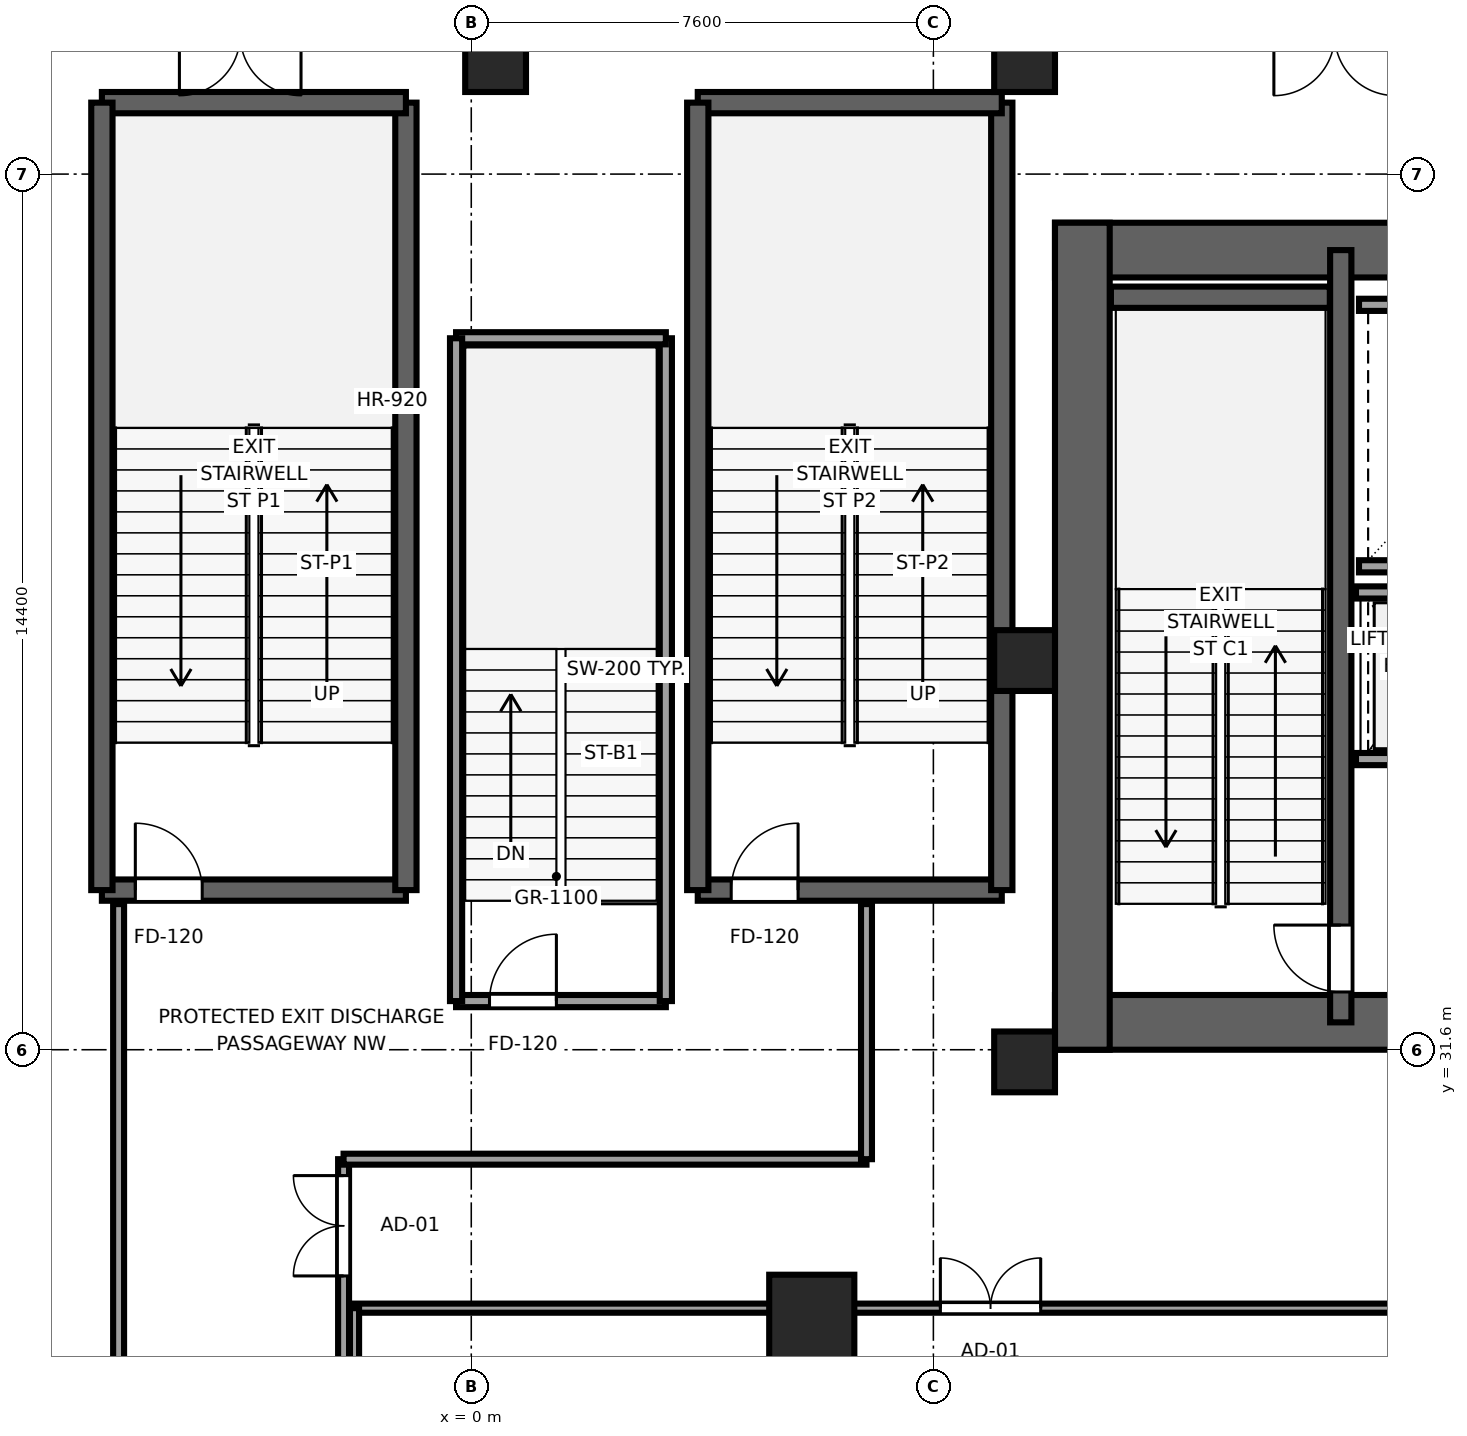
"""IFC4 building model, lengths in metres.
Left out: names, types, materials, properties, quantities, classifications, styles, units other than length and angle.
Written with IfcOpenShell. Run it as: python <this file> out.ifc"""

import sys

from ifc_helpers import new_model, si_unit, direction, frame, frame_2d, origin, origin_2d, place, context, subcontext, project, spatial, rectangle, extrude, source, transform, mapped, element, fill, save


model = new_model("IFC4")
c1 = context("Model", 3, precision=1e-05, world=origin(), true_north=direction((0.0, 1.0)))
c2 = subcontext(c1, "Body", "Model", "MODEL_VIEW")
j1 = project(units=[si_unit("LENGTHUNIT", "METRE"), si_unit("PLANEANGLEUNIT", "RADIAN")], contexts=[c1])
p1 = place(None, origin())
s1 = spatial("IfcSite", under=j1, at=p1, CompositionType="ELEMENT")
p2 = place(p1, origin())
s2 = spatial("IfcBuilding", under=s1, at=p2, CompositionType="ELEMENT")
p3 = place(p2, origin())
s3 = spatial("IfcBuildingStorey", under=s2, at=p3, CompositionType="ELEMENT", Elevation=0.0)
p4 = place(p3, frame((9.6, 32.05, 0.0), z_axis=(0.0, 0.0, 1.0), x_axis=(1.0, 0.0, 0.0)))
e1 = element("IfcWall", 1, at=p4, inside=s3, PredefinedType="SHEAR", context=c2, shape_type="SweptSolid", body=[
    extrude(rectangle(XDim=26.8, YDim=0.9, at=frame_2d((13.4, 0.0))), origin(), (0.0, 0.0, 1.0), 6.0),
])
p5 = place(p4, frame((7.85, 0.0, 0.0), z_axis=(0.0, 0.0, 1.0), x_axis=(-1.0, 0.0, 0.0)))
e2 = element("IfcOpeningElement", 2, at=p5, cuts=e1, PredefinedType="OPENING", context=c2, shape_type="SweptSolid", body=[
    extrude(rectangle(XDim=1.5, YDim=2.04, at=frame_2d((0.75, 1.02))), frame((0.0, 0.46, 0.0), z_axis=(0.0, -1.0, 0.0), x_axis=(1.0, 0.0, 0.0)), (0.0, 0.0, 1.0), 0.92),
])
p6 = place(p4, frame((14.15, 0.0, 0.0), z_axis=(0.0, 0.0, 1.0), x_axis=(-1.0, 0.0, 0.0)))
e3 = element("IfcOpeningElement", 3, at=p6, cuts=e1, PredefinedType="OPENING", context=c2, shape_type="SweptSolid", body=[
    extrude(rectangle(XDim=1.5, YDim=2.04, at=frame_2d((0.75, 1.02))), frame((0.0, 0.46, 0.0), z_axis=(0.0, -1.0, 0.0), x_axis=(1.0, 0.0, 0.0)), (0.0, 0.0, 1.0), 0.92),
])
p7 = place(p4, frame((20.45, 0.0, 0.0), z_axis=(0.0, 0.0, 1.0), x_axis=(-1.0, 0.0, 0.0)))
e4 = element("IfcOpeningElement", 4, at=p7, cuts=e1, PredefinedType="OPENING", context=c2, shape_type="SweptSolid", body=[
    extrude(rectangle(XDim=1.5, YDim=2.04, at=frame_2d((0.75, 1.02))), frame((0.0, 0.46, 0.0), z_axis=(0.0, -1.0, 0.0), x_axis=(1.0, 0.0, 0.0)), (0.0, 0.0, 1.0), 0.92),
])
p8 = place(p3, frame((9.6, 44.75, 0.0), z_axis=(0.0, 0.0, 1.0), x_axis=(1.0, 0.0, 0.0)))
e5 = element("IfcWall", 5, at=p8, inside=s3, PredefinedType="SHEAR", context=c2, shape_type="SweptSolid", body=[
    extrude(rectangle(XDim=26.8, YDim=0.9, at=frame_2d((13.4, 0.0))), origin(), (0.0, 0.0, 1.0), 6.0),
])
p9 = place(p3, frame((10.05, 31.6, 0.0), z_axis=(0.0, 0.0, 1.0), x_axis=(0.0, 1.0, 0.0)))
e6 = element("IfcWall", 6, at=p9, inside=s3, PredefinedType="SHEAR", context=c2, shape_type="SweptSolid", body=[
    extrude(rectangle(XDim=13.6, YDim=0.9, at=frame_2d((6.8, 0.0))), origin(), (0.0, 0.0, 1.0), 6.0),
])
p10 = place(p3, frame((14.3, 32.05, 0.0), z_axis=(0.0, 0.0, 1.0), x_axis=(0.0, 1.0, 0.0)))
e7 = element("IfcWall", 7, at=p10, inside=s3, PredefinedType="SHEAR", context=c2, shape_type="SweptSolid", body=[
    extrude(rectangle(XDim=12.7, YDim=0.35, at=frame_2d((6.35, 0.0))), origin(), (0.0, 0.0, 1.0), 6.0),
])
p11 = place(p10, frame((1.6, 0.0, 0.0), z_axis=(0.0, 0.0, 1.0), x_axis=(-1.0, 0.0, 0.0)))
e8 = element("IfcOpeningElement", 8, at=p11, cuts=e7, PredefinedType="OPENING", context=c2, shape_type="SweptSolid", body=[
    extrude(rectangle(XDim=1.1, YDim=2.12, at=frame_2d((0.55, 1.06))), frame((0.0, 0.185, 0.0), z_axis=(0.0, -1.0, 0.0), x_axis=(1.0, 0.0, 0.0)), (0.0, 0.0, 1.0), 0.37),
])
p12 = place(p3, frame((10.52, 43.975, 0.0), z_axis=(0.0, 0.0, 1.0), x_axis=(1.0, 0.0, 0.0)))
e9 = element("IfcWall", 9, at=p12, inside=s3, PredefinedType="SHEAR", context=c2, shape_type="SweptSolid", body=[
    extrude(rectangle(XDim=3.6, YDim=0.35, at=frame_2d((1.8, 0.0))), origin(), (0.0, 0.0, 1.0), 6.0),
])
p13 = place(p3, frame((-6.075, 34.225, 0.0), z_axis=(0.0, 0.0, 1.0), x_axis=(1.0, 0.0, 0.0)))
e10 = element("IfcWall", 10, at=p13, inside=s3, PredefinedType="SHEAR", context=c2, shape_type="SweptSolid", body=[
    extrude(rectangle(XDim=5.0, YDim=0.35, at=frame_2d((2.5, 0.0))), origin(), (0.0, 0.0, 1.0), 6.0),
])
p14 = place(p13, frame((1.65, 0.0, 0.0), z_axis=(0.0, 0.0, 1.0), x_axis=(-1.0, 0.0, 0.0)))
e11 = element("IfcOpeningElement", 11, at=p14, cuts=e10, PredefinedType="OPENING", context=c2, shape_type="SweptSolid", body=[
    extrude(rectangle(XDim=1.1, YDim=2.12, at=frame_2d((0.55, 1.06))), frame((0.0, 0.185, 0.0), z_axis=(0.0, -1.0, 0.0), x_axis=(1.0, 0.0, 0.0)), (0.0, 0.0, 1.0), 0.37),
])
p15 = place(p3, frame((-1.075, 34.225, 0.0), z_axis=(0.0, 0.0, 1.0), x_axis=(0.0, 1.0, 0.0)))
e12 = element("IfcWall", 12, at=p15, inside=s3, PredefinedType="SHEAR", context=c2, shape_type="SweptSolid", body=[
    extrude(rectangle(XDim=12.95, YDim=0.35, at=frame_2d((6.475, 0.0))), origin(), (0.0, 0.0, 1.0), 6.0),
])
p16 = place(p3, frame((-1.075, 47.175, 0.0), z_axis=(0.0, 0.0, 1.0), x_axis=(-1.0, 0.0, 0.0)))
e13 = element("IfcWall", 13, at=p16, inside=s3, PredefinedType="SHEAR", context=c2, shape_type="SweptSolid", body=[
    extrude(rectangle(XDim=5.0, YDim=0.35, at=frame_2d((2.5, 0.0))), origin(), (0.0, 0.0, 1.0), 6.0),
])
p17 = place(p3, frame((-6.075, 47.175, 0.0), z_axis=(0.0, 0.0, 1.0), x_axis=(0.0, -1.0, 0.0)))
e14 = element("IfcWall", 14, at=p17, inside=s3, PredefinedType="SHEAR", context=c2, shape_type="SweptSolid", body=[
    extrude(rectangle(XDim=12.95, YDim=0.35, at=frame_2d((6.475, 0.0))), origin(), (0.0, 0.0, 1.0), 6.0),
])
p18 = place(p3, frame((3.725, 34.225, 0.0), z_axis=(0.0, 0.0, 1.0), x_axis=(1.0, 0.0, 0.0)))
e15 = element("IfcWall", 15, at=p18, inside=s3, PredefinedType="SHEAR", context=c2, shape_type="SweptSolid", body=[
    extrude(rectangle(XDim=5.0, YDim=0.35, at=frame_2d((2.5, 0.0))), origin(), (0.0, 0.0, 1.0), 6.0),
])
p19 = place(p18, frame((1.65, 0.0, 0.0), z_axis=(0.0, 0.0, 1.0), x_axis=(-1.0, 0.0, 0.0)))
e16 = element("IfcOpeningElement", 16, at=p19, cuts=e15, PredefinedType="OPENING", context=c2, shape_type="SweptSolid", body=[
    extrude(rectangle(XDim=1.1, YDim=2.12, at=frame_2d((0.55, 1.06))), frame((0.0, 0.185, 0.0), z_axis=(0.0, -1.0, 0.0), x_axis=(1.0, 0.0, 0.0)), (0.0, 0.0, 1.0), 0.37),
])
p20 = place(p3, frame((8.725, 34.225, 0.0), z_axis=(0.0, 0.0, 1.0), x_axis=(0.0, 1.0, 0.0)))
e17 = element("IfcWall", 17, at=p20, inside=s3, PredefinedType="SHEAR", context=c2, shape_type="SweptSolid", body=[
    extrude(rectangle(XDim=12.95, YDim=0.35, at=frame_2d((6.475, 0.0))), origin(), (0.0, 0.0, 1.0), 6.0),
])
p21 = place(p3, frame((8.725, 47.175, 0.0), z_axis=(0.0, 0.0, 1.0), x_axis=(-1.0, 0.0, 0.0)))
e18 = element("IfcWall", 18, at=p21, inside=s3, PredefinedType="SHEAR", context=c2, shape_type="SweptSolid", body=[
    extrude(rectangle(XDim=5.0, YDim=0.35, at=frame_2d((2.5, 0.0))), origin(), (0.0, 0.0, 1.0), 6.0),
])
p22 = place(p3, frame((3.725, 47.175, 0.0), z_axis=(0.0, 0.0, 1.0), x_axis=(0.0, -1.0, 0.0)))
e19 = element("IfcWall", 19, at=p22, inside=s3, PredefinedType="SHEAR", context=c2, shape_type="SweptSolid", body=[
    extrude(rectangle(XDim=12.95, YDim=0.35, at=frame_2d((6.475, 0.0))), origin(), (0.0, 0.0, 1.0), 6.0),
])
m1 = source(origin(), c2, "Body", "SweptSolid", [
    extrude(rectangle(XDim=1.0, YDim=1.0, at=origin_2d()), origin(), (0.0, 0.0, 1.0), 6.0),
])
for number, where, z_axis, x_axis in (
    (20, (0.4, 47.85, 0.0), (0.0, 0.0, 1.0), (1.0, 0.0, 0.0)),
    (21, (9.1, 47.85, 0.0), (0.0, 0.0, 1.0), (1.0, 0.0, 0.0)),
    (22, (9.1, 38.0, 0.0), (0.0, 0.0, 1.0), (1.0, 0.0, 0.0)),
    (23, (9.1, 31.4, 0.0), (0.0, 0.0, 1.0), (1.0, 0.0, 0.0)),
):
    element("IfcColumn", number, at=place(p3, frame(where, z_axis=z_axis, x_axis=x_axis)), inside=s3, PredefinedType="COLUMN", context=c2, shape_type="MappedRepresentation", body=[
        mapped(m1, transform((0.0, 0.0, 0.0), x_axis=(1.0, 0.0, 0.0), y_axis=(0.0, 1.0, 0.0), z_axis=(0.0, 0.0, 1.0), scale=1.0)),
    ])
m2 = source(origin(), c2, "Body", "SweptSolid", [
    extrude(rectangle(XDim=1.4, YDim=1.4, at=origin_2d()), origin(), (0.0, 0.0, 1.0), 6.0),
])
p23 = place(p3, frame((5.6, 27.2, 0.0), z_axis=(0.0, 0.0, 1.0), x_axis=(1.0, 0.0, 0.0)))
e24 = element("IfcColumn", 24, at=p23, inside=s3, PredefinedType="COLUMN", context=c2, shape_type="MappedRepresentation", body=[
    mapped(m2, transform((0.0, 0.0, 0.0), x_axis=(1.0, 0.0, 0.0), y_axis=(0.0, 1.0, 0.0), z_axis=(0.0, 0.0, 1.0), scale=1.0)),
])
p24 = place(p3, frame((-0.25, 32.4, 0.0), z_axis=(0.0, 0.0, 1.0), x_axis=(1.0, 0.0, 0.0)))
e25 = element("IfcWall", 25, at=p24, inside=s3, PredefinedType="SOLIDWALL", context=c2, shape_type="SweptSolid", body=[
    extrude(rectangle(XDim=3.45, YDim=0.2, at=frame_2d((1.725, 0.0))), origin(), (0.0, 0.0, 1.0), 5.74),
])
p25 = place(p24, frame((1.65, 0.0, 0.0), z_axis=(0.0, 0.0, 1.0), x_axis=(-1.0, 0.0, 0.0)))
e26 = element("IfcOpeningElement", 26, at=p25, cuts=e25, PredefinedType="OPENING", context=c2, shape_type="SweptSolid", body=[
    extrude(rectangle(XDim=1.1, YDim=2.12, at=frame_2d((0.55, 1.06))), frame((0.0, 0.11, 0.0), z_axis=(0.0, -1.0, 0.0), x_axis=(1.0, 0.0, 0.0)), (0.0, 0.0, 1.0), 0.22),
])
p26 = place(p3, frame((3.2, 32.4, 0.0), z_axis=(0.0, 0.0, 1.0), x_axis=(0.0, 1.0, 0.0)))
e27 = element("IfcWall", 27, at=p26, inside=s3, PredefinedType="SOLIDWALL", context=c2, shape_type="SweptSolid", body=[
    extrude(rectangle(XDim=10.9, YDim=0.2, at=frame_2d((5.45, 0.0))), origin(), (0.0, 0.0, 1.0), 5.74),
])
p27 = place(p3, frame((3.2, 43.3, 0.0), z_axis=(0.0, 0.0, 1.0), x_axis=(-1.0, 0.0, 0.0)))
e28 = element("IfcWall", 28, at=p27, inside=s3, PredefinedType="SOLIDWALL", context=c2, shape_type="SweptSolid", body=[
    extrude(rectangle(XDim=3.45, YDim=0.2, at=frame_2d((1.725, 0.0))), origin(), (0.0, 0.0, 1.0), 5.74),
])
p28 = place(p3, frame((-0.25, 43.3, 0.0), z_axis=(0.0, 0.0, 1.0), x_axis=(0.0, -1.0, 0.0)))
e29 = element("IfcWall", 29, at=p28, inside=s3, PredefinedType="SOLIDWALL", context=c2, shape_type="SweptSolid", body=[
    extrude(rectangle(XDim=10.9, YDim=0.2, at=frame_2d((5.45, 0.0))), origin(), (0.0, 0.0, 1.0), 5.74),
])
for number, where, z_axis, x_axis in (
    (30, (14.6, 39.55, 0.0), (0.0, 0.0, 1.0), (1.0, 0.0, 0.0)),
    (31, (14.6, 43.85, 0.0), (0.0, 0.0, 1.0), (1.0, 0.0, 0.0)),
):
    element("IfcWall", number, at=place(p3, frame(where, z_axis=z_axis, x_axis=x_axis)), inside=s3, PredefinedType="SOLIDWALL", context=c2, shape_type="SweptSolid", body=[
        extrude(rectangle(XDim=4.1, YDim=0.2, at=frame_2d((2.05, 0.0))), origin(), (0.0, 0.0, 1.0), 5.74),
    ])
p29 = place(p3, frame((14.55, 36.38, 0.0), z_axis=(0.0, 0.0, 1.0), x_axis=(1.0, 0.0, 0.0)))
e32 = element("IfcWall", 32, at=p29, inside=s3, PredefinedType="SOLIDWALL", context=c2, shape_type="SweptSolid", body=[
    extrude(rectangle(XDim=4.075, YDim=0.2, at=frame_2d((2.038, 0.0))), origin(), (0.0, 0.0, 1.0), 5.74),
])
p30 = place(p29, frame((0.55, 0.0, 0.0)))
e33 = element("IfcOpeningElement", 33, at=p30, cuts=e32, PredefinedType="OPENING", context=c2, shape_type="SweptSolid", body=[
    extrude(rectangle(XDim=1.1, YDim=2.12, at=frame_2d((0.55, 1.06))), frame((0.0, 0.11, 0.0), z_axis=(0.0, -1.0, 0.0), x_axis=(1.0, 0.0, 0.0)), (0.0, 0.0, 1.0), 0.22),
])
p31 = place(p29, frame((2.45, 0.0, 0.0)))
e34 = element("IfcOpeningElement", 34, at=p31, cuts=e32, PredefinedType="OPENING", context=c2, shape_type="SweptSolid", body=[
    extrude(rectangle(XDim=1.1, YDim=2.12, at=frame_2d((0.55, 1.06))), frame((0.0, 0.11, 0.0), z_axis=(0.0, -1.0, 0.0), x_axis=(1.0, 0.0, 0.0)), (0.0, 0.0, 1.0), 0.22),
])
p32 = place(p3, frame((14.55, 39.12, 0.0), z_axis=(0.0, 0.0, 1.0), x_axis=(1.0, 0.0, 0.0)))
e35 = element("IfcWall", 35, at=p32, inside=s3, PredefinedType="SOLIDWALL", context=c2, shape_type="SweptSolid", body=[
    extrude(rectangle(XDim=4.075, YDim=0.2, at=frame_2d((2.038, 0.0))), origin(), (0.0, 0.0, 1.0), 5.74),
])
p33 = place(p3, frame((-2.1, -2.025, 0.0), z_axis=(0.0, 0.0, 1.0), x_axis=(0.0, 1.0, 0.0)))
e36 = element("IfcWall", 36, at=p33, inside=s3, PredefinedType="PARTITIONING", context=c2, shape_type="SweptSolid", body=[
    extrude(rectangle(XDim=31.825, YDim=0.18, at=frame_2d((15.913, 0.0))), origin(), (0.0, 0.0, 1.0), 5.74),
])
p34 = place(p33, frame((29.905, 0.0, 0.0)))
e37 = element("IfcOpeningElement", 37, at=p34, cuts=e36, PredefinedType="OPENING", context=c2, shape_type="SweptSolid", body=[
    extrude(rectangle(XDim=1.65, YDim=2.15, at=frame_2d((0.825, 1.075))), frame((0.0, 0.1, 0.0), z_axis=(0.0, -1.0, 0.0), x_axis=(1.0, 0.0, 0.0)), (0.0, 0.0, 1.0), 0.2),
])
p35 = place(p3, frame((-2.1, 29.8, 0.0), z_axis=(0.0, 0.0, 1.0), x_axis=(1.0, 0.0, 0.0)))
e38 = element("IfcWall", 38, at=p35, inside=s3, PredefinedType="PARTITIONING", context=c2, shape_type="SweptSolid", body=[
    extrude(rectangle(XDim=8.6, YDim=0.18, at=frame_2d((4.3, 0.0))), origin(), (0.0, 0.0, 1.0), 4.53),
])
p36 = place(p3, frame((6.5, 29.8, 0.0), z_axis=(0.0, 0.0, 1.0), x_axis=(0.0, 1.0, 0.0)))
e39 = element("IfcWall", 39, at=p36, inside=s3, PredefinedType="PARTITIONING", context=c2, shape_type="SweptSolid", body=[
    extrude(rectangle(XDim=4.195, YDim=0.18, at=frame_2d((2.098, 0.0))), origin(), (0.0, 0.0, 1.0), 5.74),
])
p37 = place(p3, frame((-5.8, -2.025, 0.0), z_axis=(0.0, 0.0, 1.0), x_axis=(0.0, 1.0, 0.0)))
e40 = element("IfcWall", 40, at=p37, inside=s3, PredefinedType="PARTITIONING", context=c2, shape_type="SweptSolid", body=[
    extrude(rectangle(XDim=36.02, YDim=0.18, at=frame_2d((18.01, 0.0))), origin(), (0.0, 0.0, 1.0), 5.74),
])
p38 = place(p3, frame((-1.92, 27.35, 0.0), z_axis=(0.0, 0.0, 1.0), x_axis=(1.0, 0.0, 0.0)))
e41 = element("IfcWall", 41, at=p38, inside=s3, PredefinedType="PARTITIONING", context=c2, shape_type="SweptSolid", body=[
    extrude(rectangle(XDim=20.92, YDim=0.15, at=frame_2d((10.46, 0.0))), origin(), (0.0, 0.0, 1.0), 4.53),
])
p39 = place(p38, frame((9.635, 0.0, 0.0)))
e42 = element("IfcOpeningElement", 42, at=p39, cuts=e41, PredefinedType="OPENING", context=c2, shape_type="SweptSolid", body=[
    extrude(rectangle(XDim=1.65, YDim=2.15, at=frame_2d((0.825, 1.075))), frame((0.0, 0.085, 0.0), z_axis=(0.0, -1.0, 0.0), x_axis=(1.0, 0.0, 0.0)), (0.0, 0.0, 1.0), 0.17),
])
p40 = place(p3, frame((-1.92, -2.025, 0.0), z_axis=(0.0, 0.0, 1.0), x_axis=(0.0, 1.0, 0.0)))
e43 = element("IfcWall", 43, at=p40, inside=s3, PredefinedType="PARTITIONING", context=c2, shape_type="SweptSolid", body=[
    extrude(rectangle(XDim=29.375, YDim=0.15, at=frame_2d((14.688, 0.0))), origin(), (0.0, 0.0, 1.0), 5.74),
])
m3 = source(origin(), c2, "Body", "SweptSolid", [
    extrude(rectangle(XDim=1.1, YDim=2.12, at=frame_2d((0.55, 1.06))), frame((0.0, 0.025, 0.0), z_axis=(0.0, -1.0, 0.0), x_axis=(1.0, 0.0, 0.0)), (0.0, 0.0, 1.0), 0.05),
])
p41 = place(p11, origin())
e44 = element("IfcDoor", 44, at=p41, inside=s3, OperationType="SINGLE_SWING_RIGHT", PredefinedType="DOOR", context=c2, shape_type="MappedRepresentation", body=[
    mapped(m3, transform((0.0, 0.0, 0.0), x_axis=(1.0, 0.0, 0.0), y_axis=(0.0, 1.0, 0.0), z_axis=(0.0, 0.0, 1.0), scale=1.0)),
])
fill(e8, e44)
p42 = place(p25, origin())
e45 = element("IfcDoor", 45, at=p42, inside=s3, OperationType="SINGLE_SWING_RIGHT", PredefinedType="DOOR", context=c2, shape_type="MappedRepresentation", body=[
    mapped(m3, transform((0.0, 0.0, 0.0), x_axis=(1.0, 0.0, 0.0), y_axis=(0.0, 1.0, 0.0), z_axis=(0.0, 0.0, 1.0), scale=1.0)),
])
fill(e26, e45)
p43 = place(p14, origin())
e46 = element("IfcDoor", 46, at=p43, inside=s3, OperationType="SINGLE_SWING_LEFT", PredefinedType="DOOR", context=c2, shape_type="MappedRepresentation", body=[
    mapped(m3, transform((0.0, 0.0, 0.0), x_axis=(1.0, 0.0, 0.0), y_axis=(0.0, 1.0, 0.0), z_axis=(0.0, 0.0, 1.0), scale=1.0)),
])
fill(e11, e46)
p44 = place(p19, origin())
e47 = element("IfcDoor", 47, at=p44, inside=s3, OperationType="SINGLE_SWING_RIGHT", PredefinedType="DOOR", context=c2, shape_type="MappedRepresentation", body=[
    mapped(m3, transform((0.0, 0.0, 0.0), x_axis=(1.0, 0.0, 0.0), y_axis=(0.0, 1.0, 0.0), z_axis=(0.0, 0.0, 1.0), scale=1.0)),
])
fill(e16, e47)
m4 = source(origin(), c2, "Body", "SweptSolid", [
    extrude(rectangle(XDim=1.65, YDim=2.15, at=frame_2d((0.825, 1.075))), frame((0.0, 0.025, 0.0), z_axis=(0.0, -1.0, 0.0), x_axis=(1.0, 0.0, 0.0)), (0.0, 0.0, 1.0), 0.05),
])
p45 = place(p34, origin())
e48 = element("IfcDoor", 48, at=p45, inside=s3, OperationType="DOUBLE_DOOR_SINGLE_SWING", PredefinedType="DOOR", context=c2, shape_type="MappedRepresentation", body=[
    mapped(m4, transform((0.0, 0.0, 0.0), x_axis=(1.0, 0.0, 0.0), y_axis=(0.0, 1.0, 0.0), z_axis=(0.0, 0.0, 1.0), scale=1.0)),
])
fill(e37, e48)
p46 = place(p39, origin())
e49 = element("IfcDoor", 49, at=p46, inside=s3, OperationType="DOUBLE_DOOR_SINGLE_SWING", PredefinedType="DOOR", context=c2, shape_type="MappedRepresentation", body=[
    mapped(m4, transform((0.0, 0.0, 0.0), x_axis=(1.0, 0.0, 0.0), y_axis=(0.0, 1.0, 0.0), z_axis=(0.0, 0.0, 1.0), scale=1.0)),
])
fill(e42, e49)
save(model, sys.argv[1])
